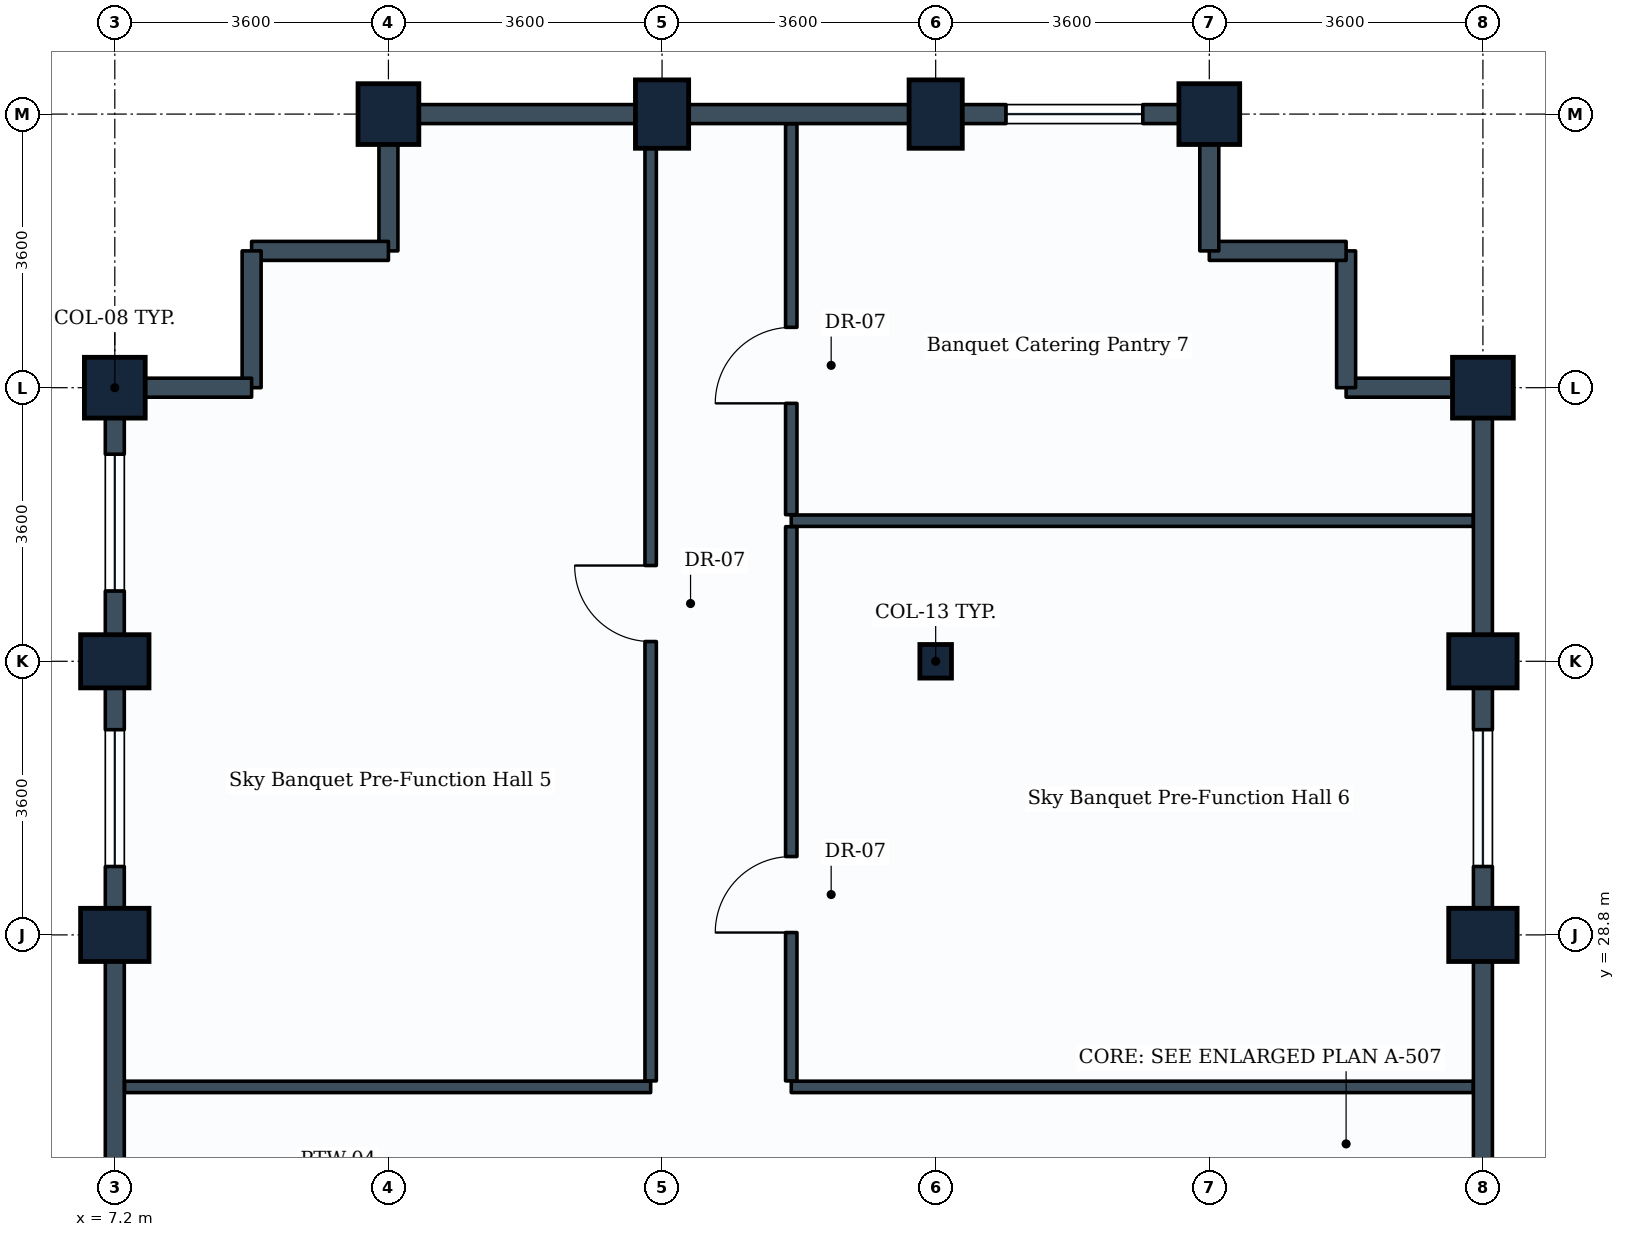
"""IFC4 building model, lengths in metres.
Left out: names, types, materials, properties, quantities, classifications, styles, units other than length and angle.
Written with IfcOpenShell. Run it as: python <this file> out.ifc"""

import sys

from ifc_helpers import new_model, si_unit, direction, frame, frame_2d, origin, origin_2d, place, context, subcontext, project, spatial, rectangle, i_section, extrude, element, fill, save


model = new_model("IFC4")
c1 = context("Model", 3, precision=1e-05, world=origin(), true_north=direction((0.0, 1.0)))
c2 = subcontext(c1, "Body", "Model", "MODEL_VIEW")
j1 = project(units=[si_unit("LENGTHUNIT", "METRE"), si_unit("PLANEANGLEUNIT", "RADIAN")], contexts=[c1])
p1 = place(None, origin())
s1 = spatial("IfcSite", under=j1, at=p1, CompositionType="ELEMENT")
p2 = place(p1, origin())
s2 = spatial("IfcBuilding", under=s1, at=p2, CompositionType="ELEMENT")
p3 = place(p2, frame((0.0, 0.0, 205.2)))
s3 = spatial("IfcBuildingStorey", under=s2, at=p3, CompositionType="ELEMENT", Elevation=205.2)
for number, where, z_axis, x_axis in (
    (1, (7.2, 28.8, 0.0), (0.0, 0.0, 1.0), (0.0, 1.0, 0.0)),
    (2, (7.2, 32.4, 0.0), (0.0, 0.0, 1.0), (0.0, 1.0, 0.0)),
):
    element("IfcColumn", number, at=place(p3, frame(where, z_axis=z_axis, x_axis=x_axis)), inside=s3, PredefinedType="COLUMN", context=c2, shape_type="SweptSolid", body=[
        extrude(rectangle(XDim=0.7, YDim=0.9, at=origin_2d()), origin(), (0.0, 0.0, 1.0), 3.8),
    ])
for number, where, z_axis, x_axis in (
    (3, (7.2, 36.0, 0.0), (0.0, 0.0, 1.0), (0.0, 1.0, 0.0)),
    (4, (10.8, 39.6, 0.0), (0.0, 0.0, 1.0), (1.0, 0.0, 0.0)),
):
    element("IfcColumn", number, at=place(p3, frame(where, z_axis=z_axis, x_axis=x_axis)), inside=s3, PredefinedType="COLUMN", context=c2, shape_type="SweptSolid", body=[
        extrude(rectangle(XDim=0.8, YDim=0.8, at=origin_2d()), origin(), (0.0, 0.0, 1.0), 3.8),
    ])
p4 = place(p3, frame((14.4, 39.6, 0.0), z_axis=(0.0, 0.0, 1.0), x_axis=(1.0, 0.0, 0.0)))
e5 = element("IfcColumn", 5, at=p4, inside=s3, PredefinedType="COLUMN", context=c2, shape_type="SweptSolid", body=[
    extrude(rectangle(XDim=0.7, YDim=0.9, at=origin_2d()), origin(), (0.0, 0.0, 1.0), 3.8),
])
p5 = place(p3, frame((18.0, 32.4, 0.0), z_axis=(0.0, 0.0, 1.0), x_axis=(1.0, 0.0, 0.0)))
e6 = element("IfcColumn", 6, at=p5, inside=s3, PredefinedType="COLUMN", context=c2, shape_type="SweptSolid", body=[
    extrude(i_section(OverallWidth=0.416, OverallDepth=0.442, WebThickness=0.025, FlangeThickness=0.041, FilletRadius=0.015, at=origin_2d()), origin(), (0.0, 0.0, 1.0), 3.8),
])
p6 = place(p3, frame((18.0, 39.6, 0.0), z_axis=(0.0, 0.0, 1.0), x_axis=(1.0, 0.0, 0.0)))
e7 = element("IfcColumn", 7, at=p6, inside=s3, PredefinedType="COLUMN", context=c2, shape_type="SweptSolid", body=[
    extrude(rectangle(XDim=0.7, YDim=0.9, at=origin_2d()), origin(), (0.0, 0.0, 1.0), 3.8),
])
p7 = place(p3, frame((21.6, 39.6, 0.0), z_axis=(0.0, 0.0, 1.0), x_axis=(1.0, 0.0, 0.0)))
e8 = element("IfcColumn", 8, at=p7, inside=s3, PredefinedType="COLUMN", context=c2, shape_type="SweptSolid", body=[
    extrude(rectangle(XDim=0.8, YDim=0.8, at=origin_2d()), origin(), (0.0, 0.0, 1.0), 3.8),
])
for number, where, z_axis, x_axis in (
    (9, (25.2, 28.8, 0.0), (0.0, 0.0, 1.0), (0.0, 1.0, 0.0)),
    (10, (25.2, 32.4, 0.0), (0.0, 0.0, 1.0), (0.0, 1.0, 0.0)),
):
    element("IfcColumn", number, at=place(p3, frame(where, z_axis=z_axis, x_axis=x_axis)), inside=s3, PredefinedType="COLUMN", context=c2, shape_type="SweptSolid", body=[
        extrude(rectangle(XDim=0.7, YDim=0.9, at=origin_2d()), origin(), (0.0, 0.0, 1.0), 3.8),
    ])
p8 = place(p3, frame((25.2, 36.0, 0.0), z_axis=(0.0, 0.0, 1.0), x_axis=(0.0, 1.0, 0.0)))
e11 = element("IfcColumn", 11, at=p8, inside=s3, PredefinedType="COLUMN", context=c2, shape_type="SweptSolid", body=[
    extrude(rectangle(XDim=0.8, YDim=0.8, at=origin_2d()), origin(), (0.0, 0.0, 1.0), 3.8),
])
p9 = place(p3, frame((25.2, 25.2, 0.0), z_axis=(0.0, 0.0, 1.0), x_axis=(0.0, 1.0, 0.0)))
e12 = element("IfcWall", 12, at=p9, inside=s3, PredefinedType="STANDARD", context=c2, shape_type="SweptSolid", body=[
    extrude(rectangle(XDim=3.6, YDim=0.25, at=frame_2d((1.8, 0.0))), origin(), (0.0, 0.0, 1.0), 2.93),
])
p10 = place(p3, frame((25.2, 28.8, 0.0), z_axis=(0.0, 0.0, 1.0), x_axis=(0.0, 1.0, 0.0)))
e13 = element("IfcWall", 13, at=p10, inside=s3, PredefinedType="STANDARD", context=c2, shape_type="SweptSolid", body=[
    extrude(rectangle(XDim=3.6, YDim=0.25, at=frame_2d((1.8, 0.0))), origin(), (0.0, 0.0, 1.0), 2.93),
])
p11 = place(p10, frame((0.9, 0.0, 0.85)))
e14 = element("IfcOpeningElement", 14, at=p11, cuts=e13, PredefinedType="OPENING", context=c2, shape_type="SweptSolid", body=[
    extrude(rectangle(XDim=1.8, YDim=1.35, at=frame_2d((0.9, 0.675))), frame((0.0, 0.135, 0.0), z_axis=(0.0, -1.0, 0.0), x_axis=(1.0, 0.0, 0.0)), (0.0, 0.0, 1.0), 0.27),
])
p12 = place(p3, frame((25.2, 32.4, 0.0), z_axis=(0.0, 0.0, 1.0), x_axis=(0.0, 1.0, 0.0)))
e15 = element("IfcWall", 15, at=p12, inside=s3, PredefinedType="STANDARD", context=c2, shape_type="SweptSolid", body=[
    extrude(rectangle(XDim=3.6, YDim=0.25, at=frame_2d((1.8, 0.0))), origin(), (0.0, 0.0, 1.0), 2.93),
])
p13 = place(p3, frame((23.4, 36.0, 0.0), z_axis=(0.0, 0.0, 1.0), x_axis=(1.0, 0.0, 0.0)))
e16 = element("IfcWall", 16, at=p13, inside=s3, PredefinedType="STANDARD", context=c2, shape_type="SweptSolid", body=[
    extrude(rectangle(XDim=1.8, YDim=0.25, at=frame_2d((0.9, 0.0))), origin(), (0.0, 0.0, 1.0), 2.93),
])
p14 = place(p3, frame((23.4, 36.0, 0.0), z_axis=(0.0, 0.0, 1.0), x_axis=(0.0, 1.0, 0.0)))
e17 = element("IfcWall", 17, at=p14, inside=s3, PredefinedType="STANDARD", context=c2, shape_type="SweptSolid", body=[
    extrude(rectangle(XDim=1.8, YDim=0.25, at=frame_2d((0.9, 0.0))), origin(), (0.0, 0.0, 1.0), 3.465),
])
p15 = place(p3, frame((21.6, 37.8, 0.0), z_axis=(0.0, 0.0, 1.0), x_axis=(1.0, 0.0, 0.0)))
e18 = element("IfcWall", 18, at=p15, inside=s3, PredefinedType="STANDARD", context=c2, shape_type="SweptSolid", body=[
    extrude(rectangle(XDim=1.8, YDim=0.25, at=frame_2d((0.9, 0.0))), origin(), (0.0, 0.0, 1.0), 3.465),
])
p16 = place(p3, frame((21.6, 37.8, 0.0), z_axis=(0.0, 0.0, 1.0), x_axis=(0.0, 1.0, 0.0)))
e19 = element("IfcWall", 19, at=p16, inside=s3, PredefinedType="STANDARD", context=c2, shape_type="SweptSolid", body=[
    extrude(rectangle(XDim=1.8, YDim=0.25, at=frame_2d((0.9, 0.0))), origin(), (0.0, 0.0, 1.0), 2.93),
])
p17 = place(p3, frame((18.0, 39.6, 0.0), z_axis=(0.0, 0.0, 1.0), x_axis=(1.0, 0.0, 0.0)))
e20 = element("IfcWall", 20, at=p17, inside=s3, PredefinedType="STANDARD", context=c2, shape_type="SweptSolid", body=[
    extrude(rectangle(XDim=3.6, YDim=0.25, at=frame_2d((1.8, 0.0))), origin(), (0.0, 0.0, 1.0), 2.93),
])
p18 = place(p17, frame((0.925, 0.0, 0.85)))
e21 = element("IfcOpeningElement", 21, at=p18, cuts=e20, PredefinedType="OPENING", context=c2, shape_type="SweptSolid", body=[
    extrude(rectangle(XDim=1.8, YDim=1.35, at=frame_2d((0.9, 0.675))), frame((0.0, 0.135, 0.0), z_axis=(0.0, -1.0, 0.0), x_axis=(1.0, 0.0, 0.0)), (0.0, 0.0, 1.0), 0.27),
])
p19 = place(p3, frame((14.4, 39.6, 0.0), z_axis=(0.0, 0.0, 1.0), x_axis=(1.0, 0.0, 0.0)))
e22 = element("IfcWall", 22, at=p19, inside=s3, PredefinedType="STANDARD", context=c2, shape_type="SweptSolid", body=[
    extrude(rectangle(XDim=3.6, YDim=0.25, at=frame_2d((1.8, 0.0))), origin(), (0.0, 0.0, 1.0), 2.93),
])
p20 = place(p3, frame((10.8, 39.6, 0.0), z_axis=(0.0, 0.0, 1.0), x_axis=(1.0, 0.0, 0.0)))
e23 = element("IfcWall", 23, at=p20, inside=s3, PredefinedType="STANDARD", context=c2, shape_type="SweptSolid", body=[
    extrude(rectangle(XDim=3.6, YDim=0.25, at=frame_2d((1.8, 0.0))), origin(), (0.0, 0.0, 1.0), 2.93),
])
p21 = place(p3, frame((10.8, 37.8, 0.0), z_axis=(0.0, 0.0, 1.0), x_axis=(0.0, 1.0, 0.0)))
e24 = element("IfcWall", 24, at=p21, inside=s3, PredefinedType="STANDARD", context=c2, shape_type="SweptSolid", body=[
    extrude(rectangle(XDim=1.8, YDim=0.25, at=frame_2d((0.9, 0.0))), origin(), (0.0, 0.0, 1.0), 2.93),
])
for number, where, z_axis, x_axis in (
    (25, (9.0, 37.8, 0.0), (0.0, 0.0, 1.0), (1.0, 0.0, 0.0)),
    (26, (9.0, 36.0, 0.0), (0.0, 0.0, 1.0), (0.0, 1.0, 0.0)),
):
    element("IfcWall", number, at=place(p3, frame(where, z_axis=z_axis, x_axis=x_axis)), inside=s3, PredefinedType="STANDARD", context=c2, shape_type="SweptSolid", body=[
        extrude(rectangle(XDim=1.8, YDim=0.25, at=frame_2d((0.9, 0.0))), origin(), (0.0, 0.0, 1.0), 3.465),
    ])
p22 = place(p3, frame((7.2, 36.0, 0.0), z_axis=(0.0, 0.0, 1.0), x_axis=(1.0, 0.0, 0.0)))
e27 = element("IfcWall", 27, at=p22, inside=s3, PredefinedType="STANDARD", context=c2, shape_type="SweptSolid", body=[
    extrude(rectangle(XDim=1.8, YDim=0.25, at=frame_2d((0.9, 0.0))), origin(), (0.0, 0.0, 1.0), 2.93),
])
p23 = place(p3, frame((7.2, 32.4, 0.0), z_axis=(0.0, 0.0, 1.0), x_axis=(0.0, 1.0, 0.0)))
e28 = element("IfcWall", 28, at=p23, inside=s3, PredefinedType="STANDARD", context=c2, shape_type="SweptSolid", body=[
    extrude(rectangle(XDim=3.6, YDim=0.25, at=frame_2d((1.8, 0.0))), origin(), (0.0, 0.0, 1.0), 2.93),
])
p24 = place(p23, frame((0.925, 0.0, 0.85)))
e29 = element("IfcOpeningElement", 29, at=p24, cuts=e28, PredefinedType="OPENING", context=c2, shape_type="SweptSolid", body=[
    extrude(rectangle(XDim=1.8, YDim=1.35, at=frame_2d((0.9, 0.675))), frame((0.0, 0.135, 0.0), z_axis=(0.0, -1.0, 0.0), x_axis=(1.0, 0.0, 0.0)), (0.0, 0.0, 1.0), 0.27),
])
p25 = place(p3, frame((7.2, 28.8, 0.0), z_axis=(0.0, 0.0, 1.0), x_axis=(0.0, 1.0, 0.0)))
e30 = element("IfcWall", 30, at=p25, inside=s3, PredefinedType="STANDARD", context=c2, shape_type="SweptSolid", body=[
    extrude(rectangle(XDim=3.6, YDim=0.25, at=frame_2d((1.8, 0.0))), origin(), (0.0, 0.0, 1.0), 2.93),
])
p26 = place(p25, frame((0.9, 0.0, 0.85)))
e31 = element("IfcOpeningElement", 31, at=p26, cuts=e30, PredefinedType="OPENING", context=c2, shape_type="SweptSolid", body=[
    extrude(rectangle(XDim=1.8, YDim=1.35, at=frame_2d((0.9, 0.675))), frame((0.0, 0.135, 0.0), z_axis=(0.0, -1.0, 0.0), x_axis=(1.0, 0.0, 0.0)), (0.0, 0.0, 1.0), 0.27),
])
p27 = place(p3, frame((7.2, 25.2, 0.0), z_axis=(0.0, 0.0, 1.0), x_axis=(0.0, 1.0, 0.0)))
e32 = element("IfcWall", 32, at=p27, inside=s3, PredefinedType="STANDARD", context=c2, shape_type="SweptSolid", body=[
    extrude(rectangle(XDim=3.6, YDim=0.25, at=frame_2d((1.8, 0.0))), origin(), (0.0, 0.0, 1.0), 2.93),
])
p28 = place(p3, frame((7.329, 26.8, 0.0), z_axis=(0.0, 0.0, 1.0), x_axis=(1.0, 0.0, 0.0)))
e33 = element("IfcWall", 33, at=p28, inside=s3, PredefinedType="PARTITIONING", context=c2, shape_type="SweptSolid", body=[
    extrude(rectangle(XDim=6.921, YDim=0.15, at=frame_2d((3.46, 0.0))), origin(), (0.0, 0.0, 1.0), 2.93),
])
p29 = place(p3, frame((14.25, 26.879, 0.0), z_axis=(0.0, 0.0, 1.0), x_axis=(0.0, 1.0, 0.0)))
e34 = element("IfcWall", 34, at=p29, inside=s3, PredefinedType="PARTITIONING", context=c2, shape_type="SweptSolid", body=[
    extrude(rectangle(XDim=12.592, YDim=0.15, at=frame_2d((6.296, 0.0))), origin(), (0.0, 0.0, 1.0), 2.93),
])
p30 = place(p29, frame((5.781, 0.0, 0.0)))
e35 = element("IfcOpeningElement", 35, at=p30, cuts=e34, PredefinedType="OPENING", context=c2, shape_type="SweptSolid", body=[
    extrude(rectangle(XDim=1.0, YDim=2.1, at=frame_2d((0.5, 1.05))), frame((0.0, 0.085, 0.0), z_axis=(0.0, -1.0, 0.0), x_axis=(1.0, 0.0, 0.0)), (0.0, 0.0, 1.0), 0.17),
])
for number, where, z_axis, x_axis in (
    (36, (16.1, 26.8, 0.0), (0.0, 0.0, 1.0), (1.0, 0.0, 0.0)),
    (37, (16.1, 34.25, 0.0), (0.0, 0.0, 1.0), (1.0, 0.0, 0.0)),
):
    element("IfcWall", number, at=place(p3, frame(where, z_axis=z_axis, x_axis=x_axis)), inside=s3, PredefinedType="PARTITIONING", context=c2, shape_type="SweptSolid", body=[
        extrude(rectangle(XDim=8.971, YDim=0.15, at=frame_2d((4.485, 0.0))), origin(), (0.0, 0.0, 1.0), 2.93),
    ])
p31 = place(p3, frame((16.1, 26.879, 0.0), z_axis=(0.0, 0.0, 1.0), x_axis=(0.0, 1.0, 0.0)))
e38 = element("IfcWall", 38, at=p31, inside=s3, PredefinedType="PARTITIONING", context=c2, shape_type="SweptSolid", body=[
    extrude(rectangle(XDim=7.292, YDim=0.15, at=frame_2d((3.646, 0.0))), origin(), (0.0, 0.0, 1.0), 3.16),
])
p32 = place(p31, frame((1.952, 0.0, 0.0)))
e39 = element("IfcOpeningElement", 39, at=p32, cuts=e38, PredefinedType="OPENING", context=c2, shape_type="SweptSolid", body=[
    extrude(rectangle(XDim=1.0, YDim=2.1, at=frame_2d((0.5, 1.05))), frame((0.0, 0.085, 0.0), z_axis=(0.0, -1.0, 0.0), x_axis=(1.0, 0.0, 0.0)), (0.0, 0.0, 1.0), 0.17),
])
p33 = place(p3, frame((16.1, 34.329, 0.0), z_axis=(0.0, 0.0, 1.0), x_axis=(0.0, 1.0, 0.0)))
e40 = element("IfcWall", 40, at=p33, inside=s3, PredefinedType="PARTITIONING", context=c2, shape_type="SweptSolid", body=[
    extrude(rectangle(XDim=5.142, YDim=0.15, at=frame_2d((2.571, 0.0))), origin(), (0.0, 0.0, 1.0), 2.93),
])
p34 = place(p33, frame((1.465, 0.0, 0.0)))
e41 = element("IfcOpeningElement", 41, at=p34, cuts=e40, PredefinedType="OPENING", context=c2, shape_type="SweptSolid", body=[
    extrude(rectangle(XDim=1.0, YDim=2.1, at=frame_2d((0.5, 1.05))), frame((0.0, 0.085, 0.0), z_axis=(0.0, -1.0, 0.0), x_axis=(1.0, 0.0, 0.0)), (0.0, 0.0, 1.0), 0.17),
])
p35 = place(p11, origin())
e42 = element("IfcWindow", 42, at=p35, inside=s3, PartitioningType="SINGLE_PANEL", PredefinedType="WINDOW", context=c2, shape_type="SweptSolid", body=[
    extrude(rectangle(XDim=1.8, YDim=1.35, at=frame_2d((0.9, 0.675))), frame((0.0, 0.03, 0.0), z_axis=(0.0, -1.0, 0.0), x_axis=(1.0, 0.0, 0.0)), (0.0, 0.0, 1.0), 0.06),
])
fill(e14, e42)
p36 = place(p18, origin())
e43 = element("IfcWindow", 43, at=p36, inside=s3, PartitioningType="SINGLE_PANEL", PredefinedType="WINDOW", context=c2, shape_type="SweptSolid", body=[
    extrude(rectangle(XDim=1.8, YDim=1.35, at=frame_2d((0.9, 0.675))), frame((0.0, 0.03, 0.0), z_axis=(0.0, -1.0, 0.0), x_axis=(1.0, 0.0, 0.0)), (0.0, 0.0, 1.0), 0.06),
])
fill(e21, e43)
p37 = place(p24, origin())
e44 = element("IfcWindow", 44, at=p37, inside=s3, PartitioningType="SINGLE_PANEL", PredefinedType="WINDOW", context=c2, shape_type="SweptSolid", body=[
    extrude(rectangle(XDim=1.8, YDim=1.35, at=frame_2d((0.9, 0.675))), frame((0.0, 0.03, 0.0), z_axis=(0.0, -1.0, 0.0), x_axis=(1.0, 0.0, 0.0)), (0.0, 0.0, 1.0), 0.06),
])
fill(e29, e44)
p38 = place(p26, origin())
e45 = element("IfcWindow", 45, at=p38, inside=s3, PartitioningType="SINGLE_PANEL", PredefinedType="WINDOW", context=c2, shape_type="SweptSolid", body=[
    extrude(rectangle(XDim=1.8, YDim=1.35, at=frame_2d((0.9, 0.675))), frame((0.0, 0.03, 0.0), z_axis=(0.0, -1.0, 0.0), x_axis=(1.0, 0.0, 0.0)), (0.0, 0.0, 1.0), 0.06),
])
fill(e31, e45)
p39 = place(p30, origin())
e46 = element("IfcDoor", 46, at=p39, inside=s3, OperationType="SINGLE_SWING_RIGHT", PredefinedType="DOOR", context=c2, shape_type="SweptSolid", body=[
    extrude(rectangle(XDim=1.0, YDim=2.1, at=frame_2d((0.5, 1.05))), frame((0.0, 0.025, 0.0), z_axis=(0.0, -1.0, 0.0), x_axis=(1.0, 0.0, 0.0)), (0.0, 0.0, 1.0), 0.05),
])
fill(e35, e46)
p40 = place(p32, origin())
e47 = element("IfcDoor", 47, at=p40, inside=s3, OperationType="SINGLE_SWING_LEFT", PredefinedType="DOOR", context=c2, shape_type="SweptSolid", body=[
    extrude(rectangle(XDim=1.0, YDim=2.1, at=frame_2d((0.5, 1.05))), frame((0.0, 0.025, 0.0), z_axis=(0.0, -1.0, 0.0), x_axis=(1.0, 0.0, 0.0)), (0.0, 0.0, 1.0), 0.05),
])
fill(e39, e47)
p41 = place(p34, origin())
e48 = element("IfcDoor", 48, at=p41, inside=s3, OperationType="SINGLE_SWING_LEFT", PredefinedType="DOOR", context=c2, shape_type="SweptSolid", body=[
    extrude(rectangle(XDim=1.0, YDim=2.1, at=frame_2d((0.5, 1.05))), frame((0.0, 0.025, 0.0), z_axis=(0.0, -1.0, 0.0), x_axis=(1.0, 0.0, 0.0)), (0.0, 0.0, 1.0), 0.05),
])
fill(e41, e48)
save(model, sys.argv[1])
